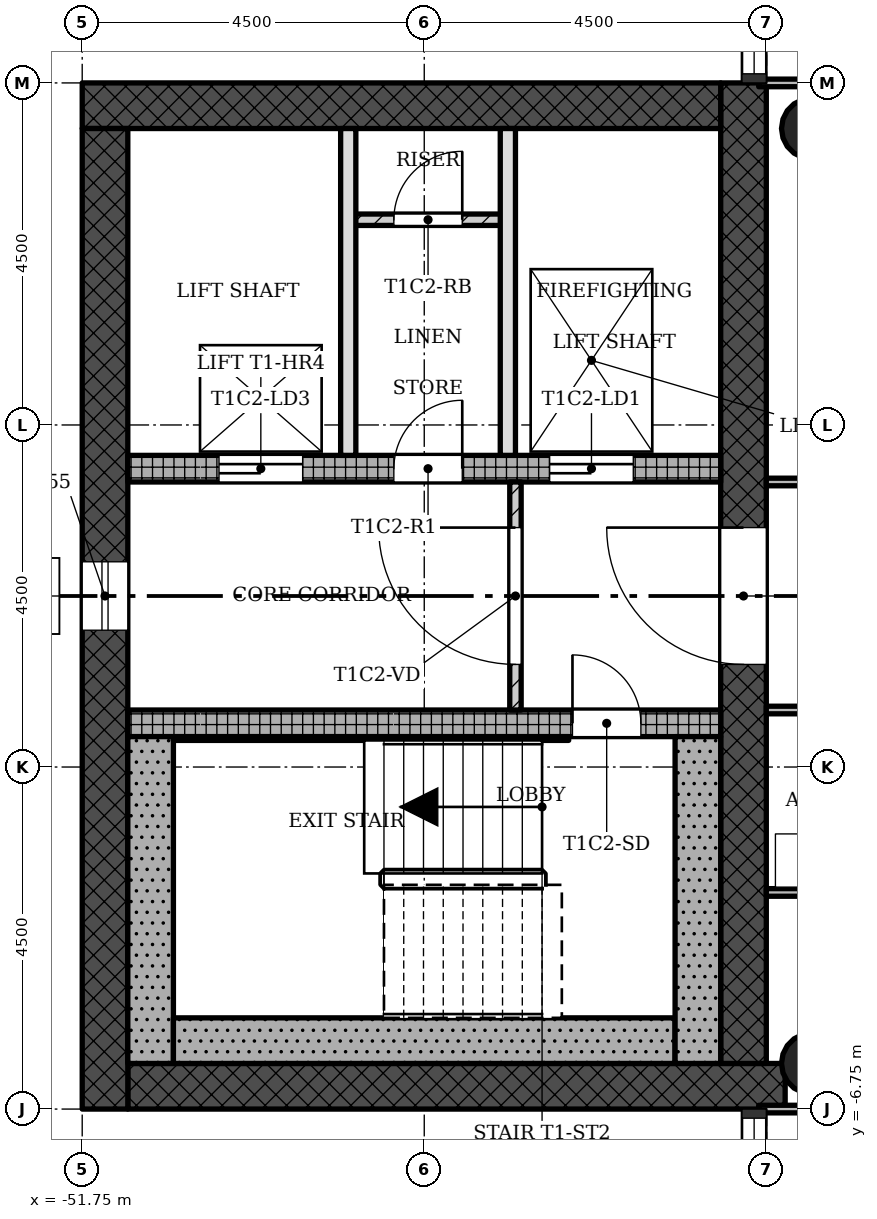
"""IFC4 building model, lengths in metres.
Left out: names, types, materials, properties, quantities, classifications, styles, units other than length and angle.
Written with IfcOpenShell. Run it as: python <this file> out.ifc"""

import sys

from ifc_helpers import new_model, si_unit, direction, frame, frame_2d, origin, origin_2d, place, context, subcontext, project, spatial, rectangle, hollow_circle, extrude, element, fill, save


model = new_model("IFC4")
c1 = context("Model", 3, precision=1e-05, world=origin(), true_north=direction((0.0, 1.0)))
c2 = subcontext(c1, "Body", "Model", "MODEL_VIEW")
j1 = project(units=[si_unit("LENGTHUNIT", "METRE"), si_unit("PLANEANGLEUNIT", "RADIAN")], contexts=[c1])
p1 = place(None, origin())
s1 = spatial("IfcSite", under=j1, at=p1, CompositionType="ELEMENT")
p2 = place(p1, origin())
s2 = spatial("IfcBuilding", under=s1, at=p2, CompositionType="ELEMENT")
p3 = place(p2, frame((0.0, 0.0, 199.4)))
s3 = spatial("IfcBuildingStorey", under=s2, at=p3, CompositionType="ELEMENT", Elevation=199.4)
p4 = place(p3, frame((-51.15, -6.45, 0.0), z_axis=(0.0, 0.0, 1.0), x_axis=(1.0, 0.0, 0.0)))
e1 = element("IfcWall", 1, at=p4, inside=s3, PredefinedType="SHEAR", context=c2, shape_type="SweptSolid", body=[
    extrude(rectangle(XDim=8.648, YDim=0.6, at=frame_2d((4.324, 0.0))), origin(), (0.0, 0.0, 1.0), 3.4),
])
p5 = place(p3, frame((-43.05, -6.15, 0.0), z_axis=(0.0, 0.0, 1.0), x_axis=(0.0, 1.0, 0.0)))
e2 = element("IfcWall", 2, at=p5, inside=s3, PredefinedType="SHEAR", context=c2, shape_type="SweptSolid", body=[
    extrude(rectangle(XDim=12.9, YDim=0.6, at=frame_2d((6.45, 0.0))), origin(), (0.0, 0.0, 1.0), 3.4),
])
p6 = place(p5, frame((5.25, 0.0, 0.0)))
e3 = element("IfcOpeningElement", 3, at=p6, cuts=e2, PredefinedType="OPENING", context=c2, shape_type="SweptSolid", body=[
    extrude(rectangle(XDim=1.8, YDim=2.1, at=frame_2d((0.9, 1.05))), frame((0.0, 0.31, 0.0), z_axis=(0.0, -1.0, 0.0), x_axis=(1.0, 0.0, 0.0)), (0.0, 0.0, 1.0), 0.62),
])
p7 = place(p3, frame((-43.35, 6.45, 0.0), z_axis=(0.0, 0.0, 1.0), x_axis=(-1.0, 0.0, 0.0)))
e4 = element("IfcWall", 4, at=p7, inside=s3, PredefinedType="SHEAR", context=c2, shape_type="SweptSolid", body=[
    extrude(rectangle(XDim=8.4, YDim=0.6, at=frame_2d((4.2, 0.0))), origin(), (0.0, 0.0, 1.0), 3.4),
])
p8 = place(p3, frame((-51.45, 6.15, 0.0), z_axis=(0.0, 0.0, 1.0), x_axis=(0.0, -1.0, 0.0)))
e5 = element("IfcWall", 5, at=p8, inside=s3, PredefinedType="SHEAR", context=c2, shape_type="SweptSolid", body=[
    extrude(rectangle(XDim=12.9, YDim=0.6, at=frame_2d((6.45, 0.0))), origin(), (0.0, 0.0, 1.0), 3.4),
])
p9 = place(p8, frame((5.7, 0.0, 0.45)))
e6 = element("IfcOpeningElement", 6, at=p9, cuts=e5, PredefinedType="OPENING", context=c2, shape_type="SweptSolid", body=[
    extrude(rectangle(XDim=0.9, YDim=2.4, at=frame_2d((0.45, 1.2))), frame((0.0, 0.31, 0.0), z_axis=(0.0, -1.0, 0.0), x_axis=(1.0, 0.0, 0.0)), (0.0, 0.0, 1.0), 0.62),
])
p10 = place(p3, frame((-51.15, -1.675, 0.0), z_axis=(0.0, 0.0, 1.0), x_axis=(1.0, 0.0, 0.0)))
e7 = element("IfcWall", 7, at=p10, inside=s3, PredefinedType="SHEAR", context=c2, shape_type="SweptSolid", body=[
    extrude(rectangle(XDim=7.8, YDim=0.35, at=frame_2d((3.9, 0.0))), origin(), (0.0, 0.0, 1.0), 3.4),
])
p11 = place(p10, frame((5.85, 0.0, 0.0)))
e8 = element("IfcOpeningElement", 8, at=p11, cuts=e7, PredefinedType="OPENING", context=c2, shape_type="SweptSolid", body=[
    extrude(rectangle(XDim=0.9, YDim=2.1, at=frame_2d((0.45, 1.05))), frame((0.0, 0.185, 0.0), z_axis=(0.0, -1.0, 0.0), x_axis=(1.0, 0.0, 0.0)), (0.0, 0.0, 1.0), 0.37),
])
p12 = place(p3, frame((-51.15, 1.675, 0.0), z_axis=(0.0, 0.0, 1.0), x_axis=(1.0, 0.0, 0.0)))
e9 = element("IfcWall", 9, at=p12, inside=s3, PredefinedType="SHEAR", context=c2, shape_type="SweptSolid", body=[
    extrude(rectangle(XDim=7.8, YDim=0.35, at=frame_2d((3.9, 0.0))), origin(), (0.0, 0.0, 1.0), 3.4),
])
p13 = place(p12, frame((5.55, 0.0, 0.0)))
e10 = element("IfcOpeningElement", 10, at=p13, cuts=e9, PredefinedType="OPENING", context=c2, shape_type="SweptSolid", body=[
    extrude(rectangle(XDim=1.1, YDim=2.1, at=frame_2d((0.55, 1.05))), frame((0.0, 0.185, 0.0), z_axis=(0.0, -1.0, 0.0), x_axis=(1.0, 0.0, 0.0)), (0.0, 0.0, 1.0), 0.37),
])
p14 = place(p12, frame((1.2, 0.0, 0.0)))
e11 = element("IfcOpeningElement", 11, at=p14, cuts=e9, PredefinedType="OPENING", context=c2, shape_type="SweptSolid", body=[
    extrude(rectangle(XDim=1.1, YDim=2.1, at=frame_2d((0.55, 1.05))), frame((0.0, 0.185, 0.0), z_axis=(0.0, -1.0, 0.0), x_axis=(1.0, 0.0, 0.0)), (0.0, 0.0, 1.0), 0.37),
])
p15 = place(p12, frame((3.5, 0.0, 0.0)))
e12 = element("IfcOpeningElement", 12, at=p15, cuts=e9, PredefinedType="OPENING", context=c2, shape_type="SweptSolid", body=[
    extrude(rectangle(XDim=0.9, YDim=2.1, at=frame_2d((0.45, 1.05))), frame((0.0, 0.185, 0.0), z_axis=(0.0, -1.0, 0.0), x_axis=(1.0, 0.0, 0.0)), (0.0, 0.0, 1.0), 0.37),
])
for number, where, z_axis, x_axis in (
    (13, (-42.15, -6.15, 0.0), (0.0, 0.0, 1.0), (1.0, 0.0, 0.0)),
    (14, (-42.15, 6.15, 0.0), (0.0, 0.0, 1.0), (1.0, 0.0, 0.0)),
):
    element("IfcColumn", number, at=place(p3, frame(where, z_axis=z_axis, x_axis=x_axis)), inside=s3, PredefinedType="COLUMN", context=c2, shape_type="SweptSolid", body=[
        extrude(hollow_circle(Radius=0.4, WallThickness=0.028, at=origin_2d()), origin(), (0.0, 0.0, 1.0), 3.4),
    ])
p16 = place(p3, frame((-46.05, 1.5, 0.0), z_axis=(0.0, 0.0, 1.0), x_axis=(0.0, -1.0, 0.0)))
e15 = element("IfcWall", 15, at=p16, inside=s3, PredefinedType="PARTITIONING", context=c2, shape_type="SweptSolid", body=[
    extrude(rectangle(XDim=3.0, YDim=0.15, at=frame_2d((1.5, 0.0))), origin(), (0.0, 0.0, 1.0), 3.0),
])
p17 = place(p16, frame((0.6, 0.0, 0.0)))
e16 = element("IfcOpeningElement", 16, at=p17, cuts=e15, PredefinedType="OPENING", context=c2, shape_type="SweptSolid", body=[
    extrude(rectangle(XDim=1.8, YDim=2.1, at=frame_2d((0.9, 1.05))), frame((0.0, 0.085, 0.0), z_axis=(0.0, -1.0, 0.0), x_axis=(1.0, 0.0, 0.0)), (0.0, 0.0, 1.0), 0.17),
])
for number, where, z_axis, x_axis in (
    (17, (-48.25, 6.15, 0.0), (0.0, 0.0, 1.0), (0.0, -1.0, 0.0)),
    (18, (-46.15, 6.15, 0.0), (0.0, 0.0, 1.0), (0.0, -1.0, 0.0)),
):
    element("IfcWall", number, at=place(p3, frame(where, z_axis=z_axis, x_axis=x_axis)), inside=s3, PredefinedType="SOLIDWALL", context=c2, shape_type="SweptSolid", body=[
        extrude(rectangle(XDim=4.3, YDim=0.2, at=frame_2d((2.15, 0.0))), origin(), (0.0, 0.0, 1.0), 3.0),
    ])
p18 = place(p3, frame((-46.15, 4.95, 0.0), z_axis=(0.0, 0.0, 1.0), x_axis=(-1.0, 0.0, 0.0)))
e19 = element("IfcWall", 19, at=p18, inside=s3, PredefinedType="PARTITIONING", context=c2, shape_type="SweptSolid", body=[
    extrude(rectangle(XDim=2.1, YDim=0.15, at=frame_2d((1.05, 0.0))), origin(), (0.0, 0.0, 1.0), 3.0),
])
p19 = place(p18, frame((0.6, 0.0, 0.0)))
e20 = element("IfcOpeningElement", 20, at=p19, cuts=e19, PredefinedType="OPENING", context=c2, shape_type="SweptSolid", body=[
    extrude(rectangle(XDim=0.9, YDim=2.1, at=frame_2d((0.45, 1.05))), frame((0.0, 0.085, 0.0), z_axis=(0.0, -1.0, 0.0), x_axis=(1.0, 0.0, 0.0)), (0.0, 0.0, 1.0), 0.17),
])
p20 = place(p3, frame((-42.85, -6.75, 0.0), z_axis=(0.0, 0.0, 1.0), x_axis=(1.0, 0.0, 0.0)))
e21 = element("IfcWall", 21, at=p20, inside=s3, PredefinedType="PARTITIONING", context=c2, shape_type="SweptSolid", body=[
    extrude(rectangle(XDim=5.95, YDim=0.1, at=frame_2d((2.975, 0.0))), origin(), (0.0, 0.0, 1.0), 3.0),
])
p21 = place(p3, frame((-42.75, -3.9, 0.0), z_axis=(0.0, 0.0, 1.0), x_axis=(1.0, 0.0, 0.0)))
e22 = element("IfcWall", 22, at=p21, inside=s3, PredefinedType="PARTITIONING", context=c2, shape_type="SweptSolid", body=[
    extrude(rectangle(XDim=2.25, YDim=0.1, at=frame_2d((1.125, 0.0))), origin(), (0.0, 0.0, 1.0), 3.0),
])
p22 = place(p3, frame((-42.75, -1.5, 0.0), z_axis=(0.0, 0.0, 1.0), x_axis=(1.0, 0.0, 0.0)))
e23 = element("IfcWall", 23, at=p22, inside=s3, PredefinedType="PARTITIONING", context=c2, shape_type="SweptSolid", body=[
    extrude(rectangle(XDim=2.25, YDim=0.1, at=frame_2d((1.125, 0.0))), origin(), (0.0, 0.0, 1.0), 3.0),
])
p23 = place(p22, frame((0.675, 0.0, 0.0)))
e24 = element("IfcOpeningElement", 24, at=p23, cuts=e23, PredefinedType="OPENING", context=c2, shape_type="SweptSolid", body=[
    extrude(rectangle(XDim=0.9, YDim=2.1, at=frame_2d((0.45, 1.05))), frame((0.0, 0.06, 0.0), z_axis=(0.0, -1.0, 0.0), x_axis=(1.0, 0.0, 0.0)), (0.0, 0.0, 1.0), 0.12),
])
p24 = place(p3, frame((-42.75, 1.5, 0.0), z_axis=(0.0, 0.0, 1.0), x_axis=(1.0, 0.0, 0.0)))
e25 = element("IfcWall", 25, at=p24, inside=s3, PredefinedType="PARTITIONING", context=c2, shape_type="SweptSolid", body=[
    extrude(rectangle(XDim=2.25, YDim=0.1, at=frame_2d((1.125, 0.0))), origin(), (0.0, 0.0, 1.0), 3.0),
])
p25 = place(p3, frame((-42.85, 6.75, 0.0), z_axis=(0.0, 0.0, 1.0), x_axis=(1.0, 0.0, 0.0)))
e26 = element("IfcWall", 26, at=p25, inside=s3, PredefinedType="PARTITIONING", context=c2, shape_type="SweptSolid", body=[
    extrude(rectangle(XDim=5.95, YDim=0.1, at=frame_2d((2.975, 0.0))), origin(), (0.0, 0.0, 1.0), 3.0),
])
p26 = place(p3, frame((-50.85, -1.85, 0.0), z_axis=(0.0, 0.0, 1.0), x_axis=(0.0, -1.0, 0.0)))
e27 = element("IfcWall", 27, at=p26, inside=s3, PredefinedType="SHEAR", context=c2, shape_type="SweptSolid", body=[
    extrude(rectangle(XDim=4.3, YDim=0.6, at=frame_2d((2.15, 0.0))), origin(), (0.0, 0.0, 1.0), 3.4),
])
p27 = place(p3, frame((-43.95, -5.85, 0.0), z_axis=(0.0, 0.0, 1.0), x_axis=(-1.0, 0.0, 0.0)))
e28 = element("IfcWall", 28, at=p27, inside=s3, PredefinedType="SHEAR", context=c2, shape_type="SweptSolid", body=[
    extrude(rectangle(XDim=6.6, YDim=0.6, at=frame_2d((3.3, 0.0))), origin(), (0.0, 0.0, 1.0), 3.4),
])
p28 = place(p3, frame((-43.65, -1.85, 0.0), z_axis=(0.0, 0.0, 1.0), x_axis=(0.0, -1.0, 0.0)))
e29 = element("IfcWall", 29, at=p28, inside=s3, PredefinedType="SHEAR", context=c2, shape_type="SweptSolid", body=[
    extrude(rectangle(XDim=4.3, YDim=0.6, at=frame_2d((2.15, 0.0))), origin(), (0.0, 0.0, 1.0), 3.4),
])
p29 = place(p3, frame((-45.35, -1.875, 0.0), z_axis=(0.0, 0.0, 1.0), x_axis=(-1.0, 0.0, 0.0)))
e30 = element("IfcWall", 30, at=p29, inside=s3, PredefinedType="SHEAR", context=c2, shape_type="SweptSolid", body=[
    extrude(rectangle(XDim=5.2, YDim=0.05, at=frame_2d((2.6, 0.0))), origin(), (0.0, 0.0, 1.0), 3.4),
])
p30 = place(p9, origin())
e31 = element("IfcWindow", 31, at=p30, inside=s3, PartitioningType="SINGLE_PANEL", PredefinedType="WINDOW", context=c2, shape_type="SweptSolid", body=[
    extrude(rectangle(XDim=0.9, YDim=2.4, at=frame_2d((0.45, 1.2))), frame((0.0, 0.03, 0.0), z_axis=(0.0, -1.0, 0.0), x_axis=(1.0, 0.0, 0.0)), (0.0, 0.0, 1.0), 0.06),
])
fill(e6, e31)
p31 = place(p17, origin())
e32 = element("IfcDoor", 32, at=p31, inside=s3, OperationType="SINGLE_SWING_LEFT", PredefinedType="DOOR", context=c2, shape_type="SweptSolid", body=[
    extrude(rectangle(XDim=1.8, YDim=2.1, at=frame_2d((0.9, 1.05))), frame((0.0, 0.025, 0.0), z_axis=(0.0, -1.0, 0.0), x_axis=(1.0, 0.0, 0.0)), (0.0, 0.0, 1.0), 0.05),
])
fill(e16, e32)
p32 = place(p19, origin())
e33 = element("IfcDoor", 33, at=p32, inside=s3, OperationType="SINGLE_SWING_LEFT", PredefinedType="DOOR", context=c2, shape_type="SweptSolid", body=[
    extrude(rectangle(XDim=0.9, YDim=2.1, at=frame_2d((0.45, 1.05))), frame((0.0, 0.025, 0.0), z_axis=(0.0, -1.0, 0.0), x_axis=(1.0, 0.0, 0.0)), (0.0, 0.0, 1.0), 0.05),
])
fill(e20, e33)
p33 = place(p11, origin())
e34 = element("IfcDoor", 34, at=p33, inside=s3, OperationType="SINGLE_SWING_RIGHT", PredefinedType="DOOR", context=c2, shape_type="SweptSolid", body=[
    extrude(rectangle(XDim=0.9, YDim=2.1, at=frame_2d((0.45, 1.05))), frame((0.0, 0.025, 0.0), z_axis=(0.0, -1.0, 0.0), x_axis=(1.0, 0.0, 0.0)), (0.0, 0.0, 1.0), 0.05),
])
fill(e8, e34)
p34 = place(p13, origin())
e35 = element("IfcDoor", 35, at=p34, inside=s3, OperationType="SLIDING_TO_LEFT", PredefinedType="DOOR", context=c2, shape_type="SweptSolid", body=[
    extrude(rectangle(XDim=1.1, YDim=2.1, at=frame_2d((0.55, 1.05))), frame((0.0, 0.025, 0.0), z_axis=(0.0, -1.0, 0.0), x_axis=(1.0, 0.0, 0.0)), (0.0, 0.0, 1.0), 0.05),
])
fill(e10, e35)
p35 = place(p14, origin())
e36 = element("IfcDoor", 36, at=p35, inside=s3, OperationType="SLIDING_TO_LEFT", PredefinedType="DOOR", context=c2, shape_type="SweptSolid", body=[
    extrude(rectangle(XDim=1.1, YDim=2.1, at=frame_2d((0.55, 1.05))), frame((0.0, 0.025, 0.0), z_axis=(0.0, -1.0, 0.0), x_axis=(1.0, 0.0, 0.0)), (0.0, 0.0, 1.0), 0.05),
])
fill(e11, e36)
p36 = place(p15, origin())
e37 = element("IfcDoor", 37, at=p36, inside=s3, OperationType="SINGLE_SWING_LEFT", PredefinedType="DOOR", context=c2, shape_type="SweptSolid", body=[
    extrude(rectangle(XDim=0.9, YDim=2.1, at=frame_2d((0.45, 1.05))), frame((0.0, 0.025, 0.0), z_axis=(0.0, -1.0, 0.0), x_axis=(1.0, 0.0, 0.0)), (0.0, 0.0, 1.0), 0.05),
])
fill(e12, e37)
p37 = place(p6, origin())
e38 = element("IfcDoor", 38, at=p37, inside=s3, OperationType="SINGLE_SWING_LEFT", PredefinedType="DOOR", context=c2, shape_type="SweptSolid", body=[
    extrude(rectangle(XDim=1.8, YDim=2.1, at=frame_2d((0.9, 1.05))), frame((0.0, 0.025, 0.0), z_axis=(0.0, -1.0, 0.0), x_axis=(1.0, 0.0, 0.0)), (0.0, 0.0, 1.0), 0.05),
])
fill(e3, e38)
save(model, sys.argv[1])
